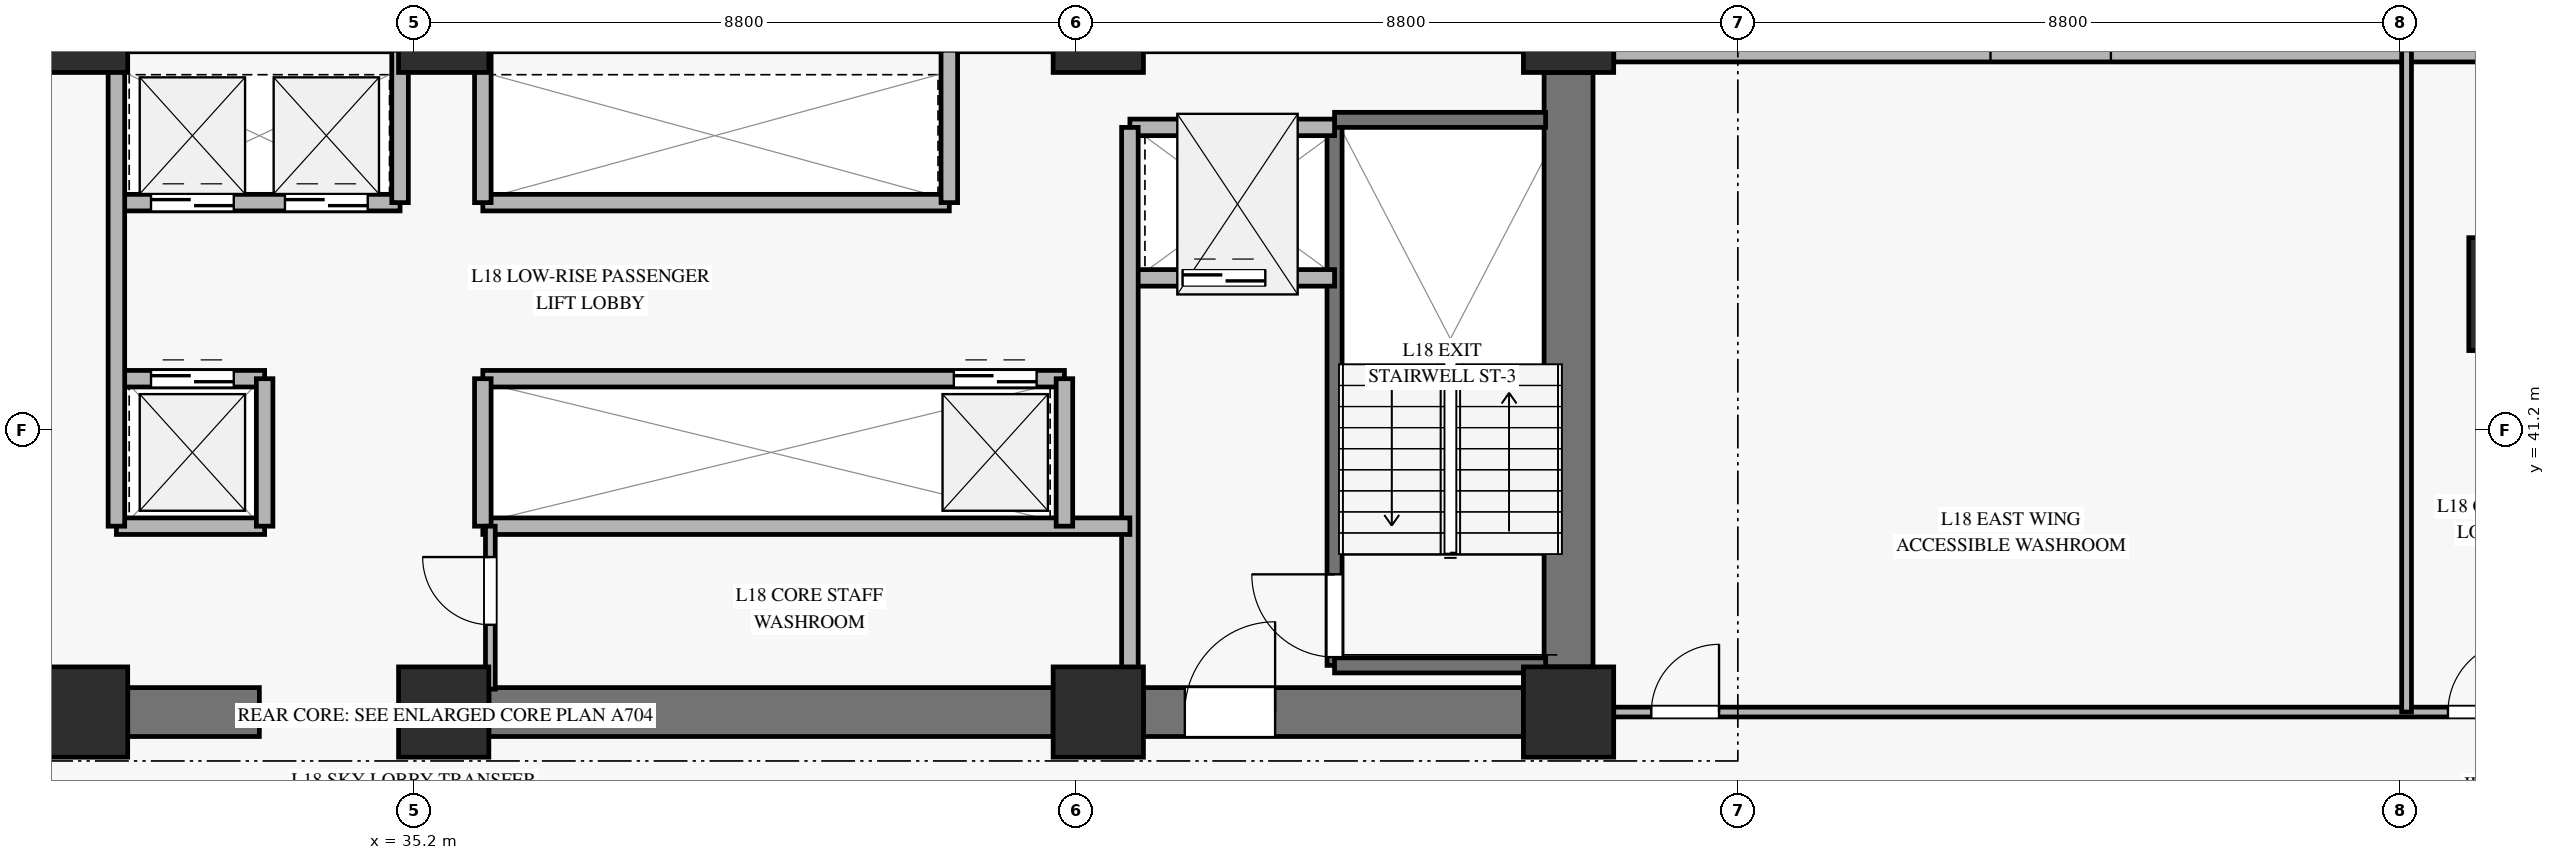
"""IFC4 building model, lengths in metres.
Left out: names, types, materials, properties, quantities, classifications, styles, units other than length and angle.
Written with IfcOpenShell. Run it as: python <this file> out.ifc"""

import sys

from ifc_helpers import new_model, si_unit, direction, frame, frame_2d, origin, origin_2d, place, context, subcontext, project, spatial, rectangle, hollow_rectangle, extrude, source, transform, mapped, element, fill, save


model = new_model("IFC4")
c1 = context("Model", 3, precision=1e-05, world=origin(), true_north=direction((0.0, 1.0)))
c2 = subcontext(c1, "Body", "Model", "MODEL_VIEW")
j1 = project(units=[si_unit("LENGTHUNIT", "METRE"), si_unit("PLANEANGLEUNIT", "RADIAN")], contexts=[c1])
p1 = place(None, origin())
s1 = spatial("IfcSite", under=j1, at=p1, CompositionType="ELEMENT")
p2 = place(p1, origin())
s2 = spatial("IfcBuilding", under=s1, at=p2, CompositionType="ELEMENT")
p3 = place(p2, frame((0.0, 0.0, 72.8)))
s3 = spatial("IfcBuildingStorey", under=s2, at=p3, CompositionType="ELEMENT", Elevation=72.8)
m1 = source(origin(), c2, "Body", "SweptSolid", [
    extrude(rectangle(XDim=1.2, YDim=1.2, at=origin_2d()), origin(), (0.0, 0.0, 1.0), 6.58),
])
for number, where, z_axis, x_axis in (
    (1, (30.8, 37.45, 0.0), (0.0, 0.0, 1.0), (1.0, 0.0, 0.0)),
    (2, (30.8, 46.55, 0.0), (0.0, 0.0, 1.0), (1.0, 0.0, 0.0)),
    (3, (35.6, 37.45, 0.0), (0.0, 0.0, 1.0), (1.0, 0.0, 0.0)),
    (4, (35.6, 46.55, 0.0), (0.0, 0.0, 1.0), (1.0, 0.0, 0.0)),
    (5, (44.3, 37.45, 0.0), (0.0, 0.0, 1.0), (1.0, 0.0, 0.0)),
    (6, (44.3, 46.55, 0.0), (0.0, 0.0, 1.0), (1.0, 0.0, 0.0)),
    (7, (50.55, 37.45, 0.0), (0.0, 0.0, 1.0), (1.0, 0.0, 0.0)),
    (8, (50.55, 46.55, 0.0), (0.0, 0.0, 1.0), (1.0, 0.0, 0.0)),
):
    element("IfcColumn", number, at=place(p3, frame(where, z_axis=z_axis, x_axis=x_axis)), inside=s3, PredefinedType="PILASTER", context=c2, shape_type="MappedRepresentation", body=[
        mapped(m1, transform((0.0, 0.0, 0.0), x_axis=(1.0, 0.0, 0.0), y_axis=(0.0, 1.0, 0.0), z_axis=(0.0, 0.0, 1.0), scale=1.0)),
    ])
p4 = place(p3, frame((31.4, 37.45, 0.0), z_axis=(0.0, 0.0, 1.0), x_axis=(1.0, 0.0, 0.0)))
e9 = element("IfcWall", 9, at=p4, inside=s3, PredefinedType="SHEAR", context=c2, shape_type="SweptSolid", body=[
    extrude(rectangle(XDim=1.75, YDim=0.65, at=frame_2d((0.875, 0.0))), origin(), (0.0, 0.0, 1.0), 6.58),
])
p5 = place(p3, frame((36.2, 37.45, 0.0), z_axis=(0.0, 0.0, 1.0), x_axis=(1.0, 0.0, 0.0)))
e10 = element("IfcWall", 10, at=p5, inside=s3, PredefinedType="SHEAR", context=c2, shape_type="SweptSolid", body=[
    extrude(rectangle(XDim=7.5, YDim=0.65, at=frame_2d((3.75, 0.0))), origin(), (0.0, 0.0, 1.0), 6.58),
])
p6 = place(p3, frame((44.9, 37.45, 0.0), z_axis=(0.0, 0.0, 1.0), x_axis=(1.0, 0.0, 0.0)))
e11 = element("IfcWall", 11, at=p6, inside=s3, PredefinedType="SHEAR", context=c2, shape_type="SweptSolid", body=[
    extrude(rectangle(XDim=5.05, YDim=0.65, at=frame_2d((2.525, 0.0))), origin(), (0.0, 0.0, 1.0), 6.58),
])
p7 = place(p6, frame((0.55, 0.0, 0.0)))
e12 = element("IfcOpeningElement", 12, at=p7, cuts=e11, PredefinedType="OPENING", context=c2, shape_type="SweptSolid", body=[
    extrude(rectangle(XDim=1.2, YDim=2.15, at=frame_2d((0.6, 1.075))), frame((0.0, 0.335, 0.0), z_axis=(0.0, -1.0, 0.0), x_axis=(1.0, 0.0, 0.0)), (0.0, 0.0, 1.0), 0.67),
])
p8 = place(p3, frame((50.55, 38.05, 0.0), z_axis=(0.0, 0.0, 1.0), x_axis=(0.0, 1.0, 0.0)))
e13 = element("IfcWall", 13, at=p8, inside=s3, PredefinedType="SHEAR", context=c2, shape_type="SweptSolid", body=[
    extrude(rectangle(XDim=7.9, YDim=0.65, at=frame_2d((3.95, 0.0))), origin(), (0.0, 0.0, 1.0), 6.58),
])
m2 = source(origin(), c2, "Body", "SweptSolid", [
    extrude(hollow_rectangle(XDim=1.5, YDim=1.5, WallThickness=0.07, at=origin_2d()), origin(), (0.0, 0.0, 1.0), 6.58),
])
p9 = place(p3, frame((63.265, 43.004, 0.0), z_axis=(0.0, 0.0, 1.0), x_axis=(1.0, 0.0, 0.0)))
e14 = element("IfcColumn", 14, at=p9, inside=s3, PredefinedType="COLUMN", context=c2, shape_type="MappedRepresentation", body=[
    mapped(m2, transform((0.0, 0.0, 0.0), x_axis=(1.0, 0.0, 0.0), y_axis=(0.0, 1.0, 0.0), z_axis=(0.0, 0.0, 1.0), scale=1.0)),
])
p10 = place(p3, frame((51.15, 46.25, 0.0), z_axis=(0.0, 0.0, 1.0), x_axis=(1.0, 0.0, 0.0)))
e15 = element("IfcWall", 15, at=p10, inside=s3, PredefinedType="SOLIDWALL", context=c2, shape_type="SweptSolid", body=[
    extrude(rectangle(XDim=11.615, YDim=0.32, at=frame_2d((5.808, 0.0))), origin(), (0.0, 0.0, 1.0), 6.06),
])
p11 = place(p10, frame((5.008, 0.0, 0.45)))
e16 = element("IfcOpeningElement", 16, at=p11, cuts=e15, PredefinedType="OPENING", context=c2, shape_type="SweptSolid", body=[
    extrude(rectangle(XDim=1.6, YDim=2.0, at=frame_2d((0.8, 1.0))), frame((0.0, 0.17, 0.0), z_axis=(0.0, -1.0, 0.0), x_axis=(1.0, 0.0, 0.0)), (0.0, 0.0, 1.0), 0.34),
])
p12 = place(p3, frame((47.44, 38.07, 0.0), z_axis=(0.0, 0.0, 1.0), x_axis=(0.0, 1.0, 0.0)))
e17 = element("IfcWall", 17, at=p12, inside=s3, PredefinedType="SOLIDWALL", context=c2, shape_type="SweptSolid", body=[
    extrude(rectangle(XDim=7.25, YDim=0.2, at=frame_2d((3.625, 0.0))), origin(), (0.0, 0.0, 1.0), 6.8),
])
p13 = place(p12, frame((0.11, 0.0, 0.0)))
e18 = element("IfcOpeningElement", 18, at=p13, cuts=e17, PredefinedType="OPENING", context=c2, shape_type="SweptSolid", body=[
    extrude(rectangle(XDim=1.1, YDim=2.15, at=frame_2d((0.55, 1.075))), frame((0.0, 0.11, 0.0), z_axis=(0.0, -1.0, 0.0), x_axis=(1.0, 0.0, 0.0)), (0.0, 0.0, 1.0), 0.22),
])
for number, where, z_axis, x_axis in (
    (19, (47.44, 45.32, 0.0), (0.0, 0.0, 1.0), (1.0, 0.0, 0.0)),
    (20, (47.44, 38.07, 0.0), (0.0, 0.0, 1.0), (1.0, 0.0, 0.0)),
):
    element("IfcWall", number, at=place(p3, frame(where, z_axis=z_axis, x_axis=x_axis)), inside=s3, PredefinedType="SOLIDWALL", context=c2, shape_type="SweptSolid", body=[
        extrude(rectangle(XDim=2.805, YDim=0.2, at=frame_2d((1.403, 0.0))), origin(), (0.0, 0.0, 1.0), 6.8),
    ])
p14 = place(p3, frame((44.72, 43.22, 0.0), z_axis=(0.0, 0.0, 1.0), x_axis=(1.0, 0.0, 0.0)))
e21 = element("IfcWall", 21, at=p14, inside=s3, PredefinedType="SOLIDWALL", context=c2, shape_type="SweptSolid", body=[
    extrude(rectangle(XDim=2.72, YDim=0.22, at=frame_2d((1.36, 0.0))), origin(), (0.0, 0.0, 1.0), 6.58),
])
p15 = place(p14, frame((0.7, 0.0, 0.0)))
e22 = element("IfcOpeningElement", 22, at=p15, cuts=e21, PredefinedType="OPENING", context=c2, shape_type="SweptSolid", body=[
    extrude(rectangle(XDim=1.1, YDim=2.2, at=frame_2d((0.55, 1.1))), frame((0.0, 0.12, 0.0), z_axis=(0.0, -1.0, 0.0), x_axis=(1.0, 0.0, 0.0)), (0.0, 0.0, 1.0), 0.24),
])
p16 = place(p3, frame((44.72, 45.22, 0.0), z_axis=(0.0, 0.0, 1.0), x_axis=(1.0, 0.0, 0.0)))
e23 = element("IfcWall", 23, at=p16, inside=s3, PredefinedType="SOLIDWALL", context=c2, shape_type="SweptSolid", body=[
    extrude(rectangle(XDim=2.72, YDim=0.22, at=frame_2d((1.36, 0.0))), origin(), (0.0, 0.0, 1.0), 6.58),
])
p17 = place(p3, frame((44.72, 37.755, 0.0), z_axis=(0.0, 0.0, 1.0), x_axis=(0.0, 1.0, 0.0)))
e24 = element("IfcWall", 24, at=p17, inside=s3, PredefinedType="SOLIDWALL", context=c2, shape_type="SweptSolid", body=[
    extrude(rectangle(XDim=7.465, YDim=0.22, at=frame_2d((3.732, 0.0))), origin(), (0.0, 0.0, 1.0), 6.58),
])
p18 = place(p3, frame((31.25, 44.22, 0.0), z_axis=(0.0, 0.0, 1.0), x_axis=(1.0, 0.0, 0.0)))
e25 = element("IfcWall", 25, at=p18, inside=s3, PredefinedType="SOLIDWALL", context=c2, shape_type="SweptSolid", body=[
    extrude(rectangle(XDim=3.77, YDim=0.22, at=frame_2d((1.885, 0.0))), origin(), (0.0, 0.0, 1.0), 6.58),
])
p19 = place(p18, frame((0.46, 0.0, 0.0)))
e26 = element("IfcOpeningElement", 26, at=p19, cuts=e25, PredefinedType="OPENING", context=c2, shape_type="SweptSolid", body=[
    extrude(rectangle(XDim=1.1, YDim=2.2, at=frame_2d((0.55, 1.1))), frame((0.0, 0.12, 0.0), z_axis=(0.0, -1.0, 0.0), x_axis=(1.0, 0.0, 0.0)), (0.0, 0.0, 1.0), 0.24),
])
p20 = place(p18, frame((2.24, 0.0, 0.0)))
e27 = element("IfcOpeningElement", 27, at=p20, cuts=e25, PredefinedType="OPENING", context=c2, shape_type="SweptSolid", body=[
    extrude(rectangle(XDim=1.1, YDim=2.2, at=frame_2d((0.55, 1.1))), frame((0.0, 0.12, 0.0), z_axis=(0.0, -1.0, 0.0), x_axis=(1.0, 0.0, 0.0)), (0.0, 0.0, 1.0), 0.24),
])
p21 = place(p3, frame((36.12, 44.22, 0.0), z_axis=(0.0, 0.0, 1.0), x_axis=(1.0, 0.0, 0.0)))
e28 = element("IfcWall", 28, at=p21, inside=s3, PredefinedType="SOLIDWALL", context=c2, shape_type="SweptSolid", body=[
    extrude(rectangle(XDim=6.2, YDim=0.22, at=frame_2d((3.1, 0.0))), origin(), (0.0, 0.0, 1.0), 6.58),
])
for number, where, z_axis, x_axis in (
    (29, (35.02, 44.22, 0.0), (0.0, 0.0, 1.0), (0.0, 1.0, 0.0)),
    (30, (36.12, 44.22, 0.0), (0.0, 0.0, 1.0), (0.0, 1.0, 0.0)),
    (31, (42.32, 44.22, 0.0), (0.0, 0.0, 1.0), (0.0, 1.0, 0.0)),
):
    element("IfcWall", number, at=place(p3, frame(where, z_axis=z_axis, x_axis=x_axis)), inside=s3, PredefinedType="SOLIDWALL", context=c2, shape_type="SweptSolid", body=[
        extrude(rectangle(XDim=2.025, YDim=0.22, at=frame_2d((1.013, 0.0))), origin(), (0.0, 0.0, 1.0), 6.58),
    ])
p22 = place(p3, frame((31.25, 41.88, 0.0), z_axis=(0.0, 0.0, 1.0), x_axis=(1.0, 0.0, 0.0)))
e32 = element("IfcWall", 32, at=p22, inside=s3, PredefinedType="SOLIDWALL", context=c2, shape_type="SweptSolid", body=[
    extrude(rectangle(XDim=1.97, YDim=0.22, at=frame_2d((0.985, 0.0))), origin(), (0.0, 0.0, 1.0), 6.58),
])
p23 = place(p22, frame((0.46, 0.0, 0.0)))
e33 = element("IfcOpeningElement", 33, at=p23, cuts=e32, PredefinedType="OPENING", context=c2, shape_type="SweptSolid", body=[
    extrude(rectangle(XDim=1.1, YDim=2.2, at=frame_2d((0.55, 1.1))), frame((0.0, 0.12, 0.0), z_axis=(0.0, -1.0, 0.0), x_axis=(1.0, 0.0, 0.0)), (0.0, 0.0, 1.0), 0.24),
])
p24 = place(p3, frame((36.12, 41.88, 0.0), z_axis=(0.0, 0.0, 1.0), x_axis=(1.0, 0.0, 0.0)))
e34 = element("IfcWall", 34, at=p24, inside=s3, PredefinedType="SOLIDWALL", context=c2, shape_type="SweptSolid", body=[
    extrude(rectangle(XDim=7.73, YDim=0.22, at=frame_2d((3.865, 0.0))), origin(), (0.0, 0.0, 1.0), 6.58),
])
p25 = place(p24, frame((6.26, 0.0, 0.0)))
e35 = element("IfcOpeningElement", 35, at=p25, cuts=e34, PredefinedType="OPENING", context=c2, shape_type="SweptSolid", body=[
    extrude(rectangle(XDim=1.1, YDim=2.2, at=frame_2d((0.55, 1.1))), frame((0.0, 0.12, 0.0), z_axis=(0.0, -1.0, 0.0), x_axis=(1.0, 0.0, 0.0)), (0.0, 0.0, 1.0), 0.24),
])
p26 = place(p3, frame((31.25, 39.92, 0.0), z_axis=(0.0, 0.0, 1.0), x_axis=(1.0, 0.0, 0.0)))
e36 = element("IfcWall", 36, at=p26, inside=s3, PredefinedType="SOLIDWALL", context=c2, shape_type="SweptSolid", body=[
    extrude(rectangle(XDim=1.97, YDim=0.22, at=frame_2d((0.985, 0.0))), origin(), (0.0, 0.0, 1.0), 6.58),
])
p27 = place(p3, frame((33.22, 39.92, 0.0), z_axis=(0.0, 0.0, 1.0), x_axis=(0.0, 1.0, 0.0)))
e37 = element("IfcWall", 37, at=p27, inside=s3, PredefinedType="SOLIDWALL", context=c2, shape_type="SweptSolid", body=[
    extrude(rectangle(XDim=1.96, YDim=0.22, at=frame_2d((0.98, 0.0))), origin(), (0.0, 0.0, 1.0), 6.58),
])
p28 = place(p3, frame((36.12, 39.92, 0.0), z_axis=(0.0, 0.0, 1.0), x_axis=(1.0, 0.0, 0.0)))
e38 = element("IfcWall", 38, at=p28, inside=s3, PredefinedType="SOLIDWALL", context=c2, shape_type="SweptSolid", body=[
    extrude(rectangle(XDim=8.6, YDim=0.22, at=frame_2d((4.3, 0.0))), origin(), (0.0, 0.0, 1.0), 5.865),
])
p29 = place(p3, frame((36.12, 39.92, 0.0), z_axis=(0.0, 0.0, 1.0), x_axis=(0.0, 1.0, 0.0)))
e39 = element("IfcWall", 39, at=p29, inside=s3, PredefinedType="SOLIDWALL", context=c2, shape_type="SweptSolid", body=[
    extrude(rectangle(XDim=1.96, YDim=0.22, at=frame_2d((0.98, 0.0))), origin(), (0.0, 0.0, 1.0), 6.58),
])
p30 = place(p3, frame((31.25, 39.92, 0.0), z_axis=(0.0, 0.0, 1.0), x_axis=(0.0, 1.0, 0.0)))
e40 = element("IfcWall", 40, at=p30, inside=s3, PredefinedType="SOLIDWALL", context=c2, shape_type="SweptSolid", body=[
    extrude(rectangle(XDim=6.325, YDim=0.22, at=frame_2d((3.163, 0.0))), origin(), (0.0, 0.0, 1.0), 6.58),
])
p31 = place(p3, frame((43.85, 39.92, 0.0), z_axis=(0.0, 0.0, 1.0), x_axis=(0.0, 1.0, 0.0)))
e41 = element("IfcWall", 41, at=p31, inside=s3, PredefinedType="SOLIDWALL", context=c2, shape_type="SweptSolid", body=[
    extrude(rectangle(XDim=1.96, YDim=0.22, at=frame_2d((0.98, 0.0))), origin(), (0.0, 0.0, 1.0), 6.58),
])
p32 = place(p3, frame((36.22, 37.755, 0.0), z_axis=(0.0, 0.0, 1.0), x_axis=(0.0, 1.0, 0.0)))
e42 = element("IfcWall", 42, at=p32, inside=s3, PredefinedType="PARTITIONING", context=c2, shape_type="SweptSolid", body=[
    extrude(rectangle(XDim=2.165, YDim=0.13, at=frame_2d((1.083, 0.0))), origin(), (0.0, 0.0, 1.0), 6.58),
])
p33 = place(p32, frame((0.855, 0.0, 0.0)))
e43 = element("IfcOpeningElement", 43, at=p33, cuts=e42, PredefinedType="OPENING", context=c2, shape_type="SweptSolid", body=[
    extrude(rectangle(XDim=0.9, YDim=2.1, at=frame_2d((0.45, 1.05))), frame((0.0, 0.075, 0.0), z_axis=(0.0, -1.0, 0.0), x_axis=(1.0, 0.0, 0.0)), (0.0, 0.0, 1.0), 0.15),
])
p34 = place(p3, frame((51.15, 37.45, 0.0), z_axis=(0.0, 0.0, 1.0), x_axis=(1.0, 0.0, 0.0)))
e44 = element("IfcWall", 44, at=p34, inside=s3, PredefinedType="PARTITIONING", context=c2, shape_type="SweptSolid", body=[
    extrude(rectangle(XDim=15.211, YDim=0.13, at=frame_2d((7.605, 0.0))), origin(), (0.0, 0.0, 1.0), 6.065),
])
p35 = place(p34, frame((0.5, 0.0, 0.0)))
e45 = element("IfcOpeningElement", 45, at=p35, cuts=e44, PredefinedType="OPENING", context=c2, shape_type="SweptSolid", body=[
    extrude(rectangle(XDim=0.9, YDim=2.1, at=frame_2d((0.45, 1.05))), frame((0.0, 0.075, 0.0), z_axis=(0.0, -1.0, 0.0), x_axis=(1.0, 0.0, 0.0)), (0.0, 0.0, 1.0), 0.15),
])
p36 = place(p34, frame((11.088, 0.0, 0.0)))
e46 = element("IfcOpeningElement", 46, at=p36, cuts=e44, PredefinedType="OPENING", context=c2, shape_type="SweptSolid", body=[
    extrude(rectangle(XDim=0.95, YDim=2.1, at=frame_2d((0.475, 1.05))), frame((0.0, 0.075, 0.0), z_axis=(0.0, -1.0, 0.0), x_axis=(1.0, 0.0, 0.0)), (0.0, 0.0, 1.0), 0.15),
])
p37 = place(p3, frame((61.688, 37.45, 0.0), z_axis=(0.0, 0.0, 1.0), x_axis=(0.0, 1.0, 0.0)))
e47 = element("IfcWall", 47, at=p37, inside=s3, PredefinedType="PARTITIONING", context=c2, shape_type="SweptSolid", body=[
    extrude(rectangle(XDim=8.8, YDim=0.13, at=frame_2d((4.4, 0.0))), origin(), (0.0, 0.0, 1.0), 6.58),
])
m3 = source(origin(), c2, "Body", "SweptSolid", [
    extrude(rectangle(XDim=1.1, YDim=2.15, at=frame_2d((0.55, 1.075))), frame((0.0, 0.025, 0.0), z_axis=(0.0, -1.0, 0.0), x_axis=(1.0, 0.0, 0.0)), (0.0, 0.0, 1.0), 0.05),
])
p38 = place(p13, origin())
e48 = element("IfcDoor", 48, at=p38, inside=s3, OperationType="SINGLE_SWING_RIGHT", PredefinedType="DOOR", context=c2, shape_type="MappedRepresentation", body=[
    mapped(m3, transform((0.0, 0.0, 0.0), x_axis=(1.0, 0.0, 0.0), y_axis=(0.0, 1.0, 0.0), z_axis=(0.0, 0.0, 1.0), scale=1.0)),
])
fill(e18, e48)
m4 = source(origin(), c2, "Body", "SweptSolid", [
    extrude(rectangle(XDim=1.1, YDim=2.2, at=frame_2d((0.55, 1.1))), frame((0.0, 0.025, 0.0), z_axis=(0.0, -1.0, 0.0), x_axis=(1.0, 0.0, 0.0)), (0.0, 0.0, 1.0), 0.05),
])
p39 = place(p15, origin())
e49 = element("IfcDoor", 49, at=p39, inside=s3, OperationType="SLIDING_TO_LEFT", PredefinedType="DOOR", context=c2, shape_type="MappedRepresentation", body=[
    mapped(m4, transform((0.0, 0.0, 0.0), x_axis=(1.0, 0.0, 0.0), y_axis=(0.0, 1.0, 0.0), z_axis=(0.0, 0.0, 1.0), scale=1.0)),
])
fill(e22, e49)
m5 = source(origin(), c2, "Body", "SweptSolid", [
    extrude(rectangle(XDim=1.2, YDim=2.15, at=frame_2d((0.6, 1.075))), frame((0.0, 0.025, 0.0), z_axis=(0.0, -1.0, 0.0), x_axis=(1.0, 0.0, 0.0)), (0.0, 0.0, 1.0), 0.05),
])
p40 = place(p7, origin())
e50 = element("IfcDoor", 50, at=p40, inside=s3, OperationType="SINGLE_SWING_RIGHT", PredefinedType="DOOR", context=c2, shape_type="MappedRepresentation", body=[
    mapped(m5, transform((0.0, 0.0, 0.0), x_axis=(1.0, 0.0, 0.0), y_axis=(0.0, 1.0, 0.0), z_axis=(0.0, 0.0, 1.0), scale=1.0)),
])
fill(e12, e50)
p41 = place(p19, origin())
e51 = element("IfcDoor", 51, at=p41, inside=s3, OperationType="SLIDING_TO_LEFT", PredefinedType="DOOR", context=c2, shape_type="MappedRepresentation", body=[
    mapped(m4, transform((0.0, 0.0, 0.0), x_axis=(1.0, 0.0, 0.0), y_axis=(0.0, 1.0, 0.0), z_axis=(0.0, 0.0, 1.0), scale=1.0)),
])
fill(e26, e51)
p42 = place(p20, origin())
e52 = element("IfcDoor", 52, at=p42, inside=s3, OperationType="SLIDING_TO_LEFT", PredefinedType="DOOR", context=c2, shape_type="MappedRepresentation", body=[
    mapped(m4, transform((0.0, 0.0, 0.0), x_axis=(1.0, 0.0, 0.0), y_axis=(0.0, 1.0, 0.0), z_axis=(0.0, 0.0, 1.0), scale=1.0)),
])
fill(e27, e52)
p43 = place(p23, origin())
e53 = element("IfcDoor", 53, at=p43, inside=s3, OperationType="SLIDING_TO_LEFT", PredefinedType="DOOR", context=c2, shape_type="MappedRepresentation", body=[
    mapped(m4, transform((0.0, 0.0, 0.0), x_axis=(1.0, 0.0, 0.0), y_axis=(0.0, 1.0, 0.0), z_axis=(0.0, 0.0, 1.0), scale=1.0)),
])
fill(e33, e53)
p44 = place(p25, origin())
e54 = element("IfcDoor", 54, at=p44, inside=s3, OperationType="SLIDING_TO_LEFT", PredefinedType="DOOR", context=c2, shape_type="MappedRepresentation", body=[
    mapped(m4, transform((0.0, 0.0, 0.0), x_axis=(1.0, 0.0, 0.0), y_axis=(0.0, 1.0, 0.0), z_axis=(0.0, 0.0, 1.0), scale=1.0)),
])
fill(e35, e54)
m6 = source(origin(), c2, "Body", "SweptSolid", [
    extrude(rectangle(XDim=0.9, YDim=2.1, at=frame_2d((0.45, 1.05))), frame((0.0, 0.025, 0.0), z_axis=(0.0, -1.0, 0.0), x_axis=(1.0, 0.0, 0.0)), (0.0, 0.0, 1.0), 0.05),
])
p45 = place(p33, origin())
e55 = element("IfcDoor", 55, at=p45, inside=s3, OperationType="SINGLE_SWING_RIGHT", PredefinedType="DOOR", context=c2, shape_type="MappedRepresentation", body=[
    mapped(m6, transform((0.0, 0.0, 0.0), x_axis=(1.0, 0.0, 0.0), y_axis=(0.0, 1.0, 0.0), z_axis=(0.0, 0.0, 1.0), scale=1.0)),
])
fill(e43, e55)
p46 = place(p35, origin())
e56 = element("IfcDoor", 56, at=p46, inside=s3, OperationType="SINGLE_SWING_RIGHT", PredefinedType="DOOR", context=c2, shape_type="MappedRepresentation", body=[
    mapped(m6, transform((0.0, 0.0, 0.0), x_axis=(1.0, 0.0, 0.0), y_axis=(0.0, 1.0, 0.0), z_axis=(0.0, 0.0, 1.0), scale=1.0)),
])
fill(e45, e56)
m7 = source(origin(), c2, "Body", "SweptSolid", [
    extrude(rectangle(XDim=0.95, YDim=2.1, at=frame_2d((0.475, 1.05))), frame((0.0, 0.025, 0.0), z_axis=(0.0, -1.0, 0.0), x_axis=(1.0, 0.0, 0.0)), (0.0, 0.0, 1.0), 0.05),
])
p47 = place(p36, origin())
e57 = element("IfcDoor", 57, at=p47, inside=s3, OperationType="SINGLE_SWING_RIGHT", PredefinedType="DOOR", context=c2, shape_type="MappedRepresentation", body=[
    mapped(m7, transform((0.0, 0.0, 0.0), x_axis=(1.0, 0.0, 0.0), y_axis=(0.0, 1.0, 0.0), z_axis=(0.0, 0.0, 1.0), scale=1.0)),
])
fill(e46, e57)
save(model, sys.argv[1])
